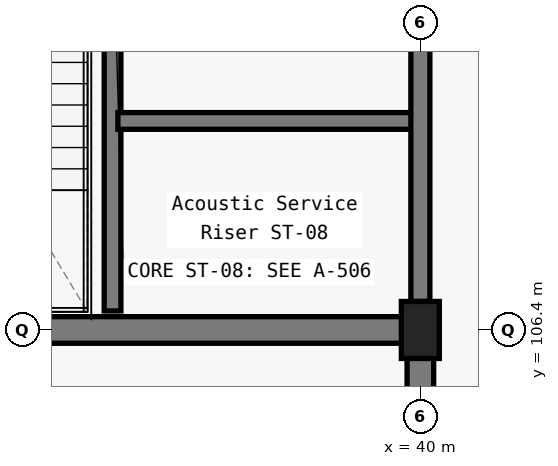
"""IFC4 building model, lengths in metres.
Left out: names, types, materials, properties, quantities, classifications, styles, units other than length and angle.
Written with IfcOpenShell. Run it as: python <this file> out.ifc"""

import sys

from ifc_helpers import new_model, si_unit, direction, frame, frame_2d, origin, origin_2d, place, context, subcontext, project, spatial, rectangle, extrude, element, save


model = new_model("IFC4")
c1 = context("Model", 3, precision=1e-05, world=origin(), true_north=direction((0.0, 1.0)))
c2 = subcontext(c1, "Body", "Model", "MODEL_VIEW")
j1 = project(units=[si_unit("LENGTHUNIT", "METRE"), si_unit("PLANEANGLEUNIT", "RADIAN")], contexts=[c1])
p1 = place(None, origin())
s1 = spatial("IfcSite", under=j1, at=p1, CompositionType="ELEMENT")
p2 = place(p1, origin())
s2 = spatial("IfcBuilding", under=s1, at=p2, CompositionType="ELEMENT")
p3 = place(p2, origin())
s3 = spatial("IfcBuildingStorey", under=s2, at=p3, CompositionType="ELEMENT", Elevation=0.0)
p4 = place(p3, frame((40.0, 106.4, 0.0), z_axis=(0.0, 0.0, 1.0), x_axis=(1.0, 0.0, 0.0)))
e1 = element("IfcColumn", 1, at=p4, inside=s3, PredefinedType="COLUMN", context=c2, shape_type="SweptSolid", body=[
    extrude(rectangle(XDim=0.5, YDim=0.75, at=origin_2d()), origin(), (0.0, 0.0, 1.0), 5.4),
])
p5 = place(p3, frame((32.0, 106.4, 0.0), z_axis=(0.0, 0.0, 1.0), x_axis=(1.0, 0.0, 0.0)))
e2 = element("IfcWall", 2, at=p5, inside=s3, PredefinedType="SHEAR", context=c2, shape_type="SweptSolid", body=[
    extrude(rectangle(XDim=8.0, YDim=0.35, at=frame_2d((4.0, 0.0))), origin(), (0.0, 0.0, 1.0), 5.1),
])
p6 = place(p3, frame((40.0, 98.8, 0.0), z_axis=(0.0, 0.0, 1.0), x_axis=(0.0, 1.0, 0.0)))
e3 = element("IfcWall", 3, at=p6, inside=s3, PredefinedType="SHEAR", context=c2, shape_type="SweptSolid", body=[
    extrude(rectangle(XDim=7.6, YDim=0.35, at=frame_2d((3.8, 0.0))), origin(), (0.0, 0.0, 1.0), 5.1),
])
p7 = place(p3, frame((35.95, 106.65, 0.0), z_axis=(0.0, 0.0, 1.0), x_axis=(0.0, 1.0, 0.0)))
e4 = element("IfcWall", 4, at=p7, inside=s3, PredefinedType="SOLIDWALL", context=c2, shape_type="SweptSolid", body=[
    extrude(rectangle(XDim=7.1, YDim=0.22, at=frame_2d((3.55, 0.0))), origin(), (0.0, 0.0, 1.0), 5.1),
])
p8 = place(p7, frame((5.55, 0.0, 0.0)))
e5 = element("IfcOpeningElement", 5, at=p8, cuts=e4, PredefinedType="OPENING", context=c2, shape_type="SweptSolid", body=[
    extrude(rectangle(XDim=1.2, YDim=2.15, at=frame_2d((0.6, 1.075))), frame((0.0, 0.12, 0.0), z_axis=(0.0, -1.0, 0.0), x_axis=(1.0, 0.0, 0.0)), (0.0, 0.0, 1.0), 0.24),
])
p9 = place(p3, frame((36.02, 109.15, 0.0), z_axis=(0.0, 0.0, 1.0), x_axis=(1.0, 0.0, 0.0)))
e6 = element("IfcWall", 6, at=p9, inside=s3, PredefinedType="SOLIDWALL", context=c2, shape_type="SweptSolid", body=[
    extrude(rectangle(XDim=3.93, YDim=0.22, at=frame_2d((1.965, 0.0))), origin(), (0.0, 0.0, 1.0), 4.455),
])
p10 = place(p3, frame((40.0, 106.775, 0.0), z_axis=(0.0, 0.0, 1.0), x_axis=(0.0, 1.0, 0.0)))
e7 = element("IfcWall", 7, at=p10, inside=s3, PredefinedType="SOLIDWALL", context=c2, shape_type="SweptSolid", body=[
    extrude(rectangle(XDim=6.925, YDim=0.25, at=frame_2d((3.462, 0.0))), origin(), (0.0, 0.0, 1.0), 4.325),
])
p11 = place(p10, frame((3.475, 0.0, 0.0)))
e8 = element("IfcOpeningElement", 8, at=p11, cuts=e7, PredefinedType="OPENING", context=c2, shape_type="SweptSolid", body=[
    extrude(rectangle(XDim=1.35, YDim=2.2, at=frame_2d((0.675, 1.1))), frame((0.0, 0.135, 0.0), z_axis=(0.0, -1.0, 0.0), x_axis=(1.0, 0.0, 0.0)), (0.0, 0.0, 1.0), 0.27),
])
save(model, sys.argv[1])
